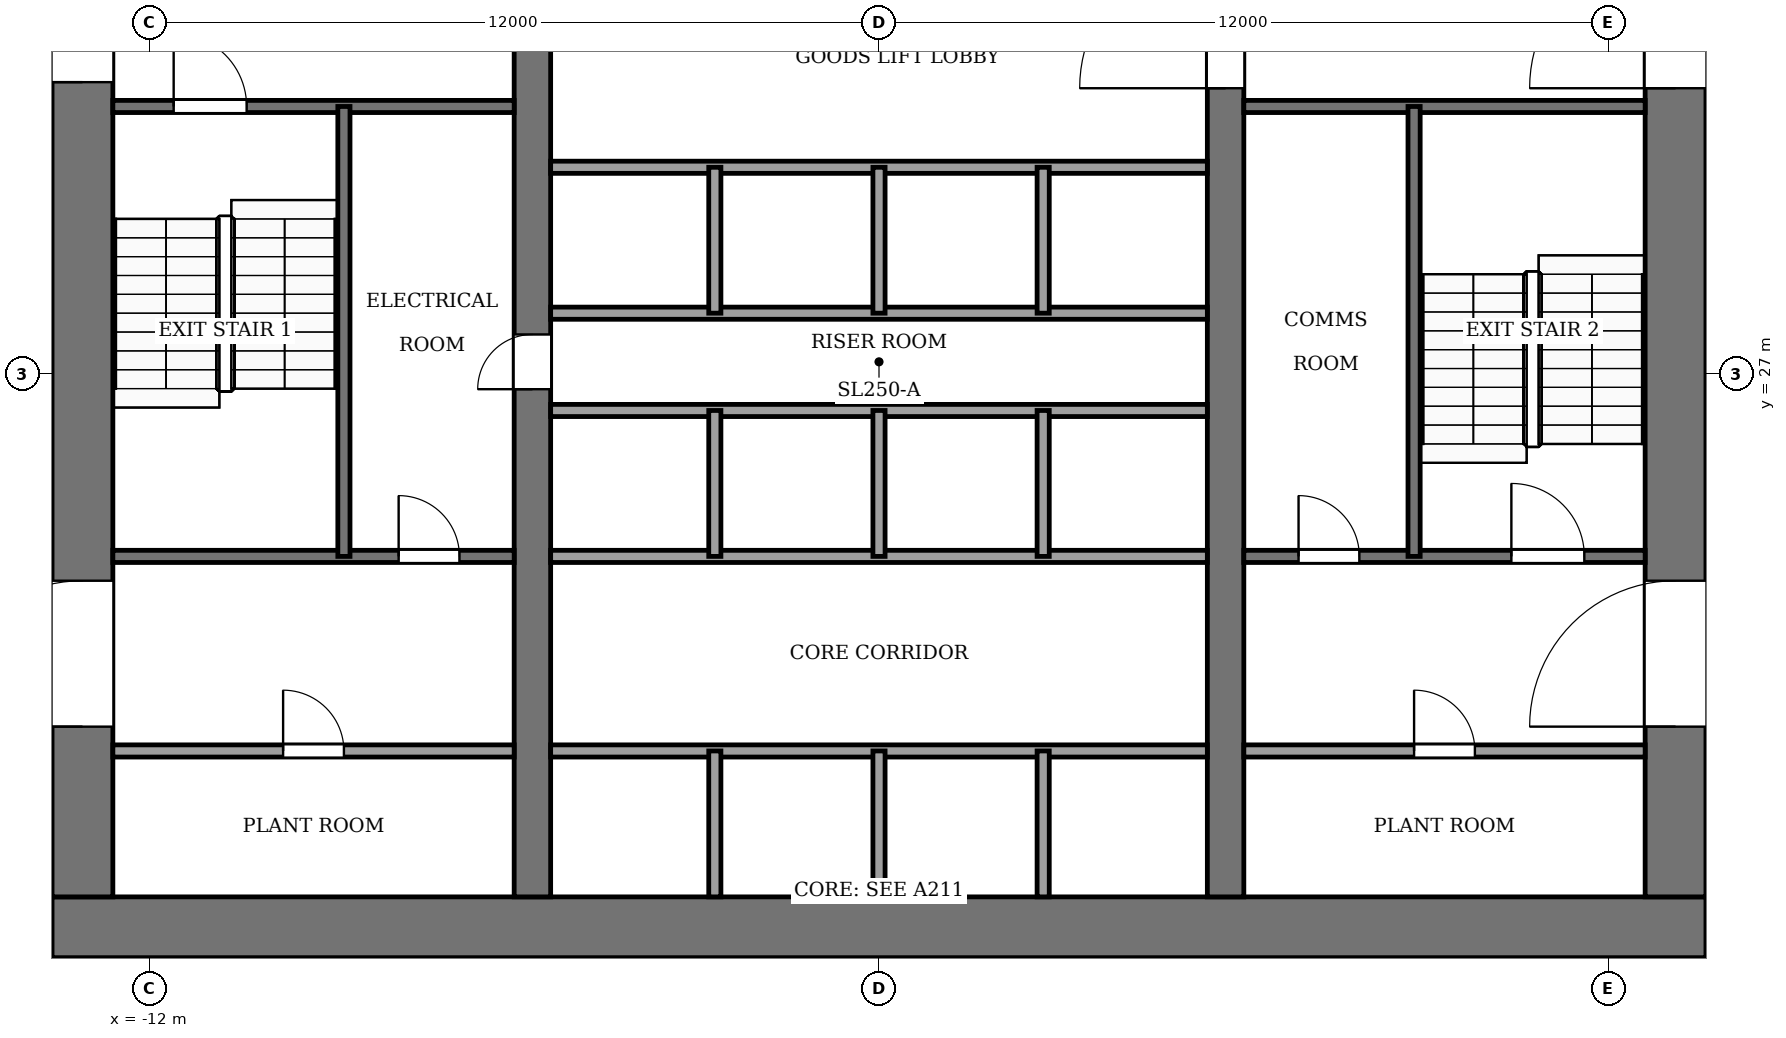
"""IFC4 building model, lengths in metres.
Left out: names, types, materials, properties, quantities, classifications, styles, units other than length and angle.
Written with IfcOpenShell. Run it as: python <this file> out.ifc"""

import sys

from ifc_helpers import new_model, si_unit, direction, frame, frame_2d, origin, place, context, subcontext, project, spatial, rectangle, extrude, element, fill, save


model = new_model("IFC4")
c1 = context("Model", 3, precision=1e-05, world=origin(), true_north=direction((0.0, 1.0)))
c2 = subcontext(c1, "Body", "Model", "MODEL_VIEW")
j1 = project(units=[si_unit("LENGTHUNIT", "METRE"), si_unit("PLANEANGLEUNIT", "RADIAN")], contexts=[c1])
p1 = place(None, origin())
s1 = spatial("IfcSite", under=j1, at=p1, CompositionType="ELEMENT")
p2 = place(p1, origin())
s2 = spatial("IfcBuilding", under=s1, at=p2, CompositionType="ELEMENT")
p3 = place(p2, frame((0.0, 0.0, 170.0)))
s3 = spatial("IfcBuildingStorey", under=s2, at=p3, CompositionType="ELEMENT", Elevation=170.0)
p4 = place(p3, frame((-13.6, 17.9, -0.25), z_axis=(0.0, 0.0, 1.0), x_axis=(1.0, 0.0, 0.0)))
e1 = element("IfcWall", 1, at=p4, inside=s3, PredefinedType="SHEAR", context=c2, shape_type="SweptSolid", body=[
    extrude(rectangle(XDim=27.2, YDim=1.0, at=frame_2d((13.6, 0.0))), origin(), (0.0, 0.0, 1.0), 7.12),
])
p5 = place(p3, frame((-13.1, 18.4, -0.25), z_axis=(0.0, 0.0, 1.0), x_axis=(0.0, 1.0, 0.0)))
e2 = element("IfcWall", 2, at=p5, inside=s3, PredefinedType="SHEAR", context=c2, shape_type="SweptSolid", body=[
    extrude(rectangle(XDim=19.2, YDim=1.0, at=frame_2d((9.6, 0.0))), origin(), (0.0, 0.0, 1.0), 7.12),
])
p6 = place(p5, frame((2.8, 0.0, 0.25)))
e3 = element("IfcOpeningElement", 3, at=p6, cuts=e2, PredefinedType="OPENING", context=c2, shape_type="SweptSolid", body=[
    extrude(rectangle(XDim=2.4, YDim=2.4, at=frame_2d((1.2, 1.2))), frame((0.0, 0.51, 0.0), z_axis=(0.0, -1.0, 0.0), x_axis=(1.0, 0.0, 0.0)), (0.0, 0.0, 1.0), 1.02),
])
p7 = place(p5, frame((13.4, 0.0, 0.25)))
e4 = element("IfcOpeningElement", 4, at=p7, cuts=e2, PredefinedType="OPENING", context=c2, shape_type="SweptSolid", body=[
    extrude(rectangle(XDim=1.4, YDim=2.2, at=frame_2d((0.7, 1.1))), frame((0.0, 0.51, 0.0), z_axis=(0.0, -1.0, 0.0), x_axis=(1.0, 0.0, 0.0)), (0.0, 0.0, 1.0), 1.02),
])
p8 = place(p3, frame((13.1, 18.4, -0.25), z_axis=(0.0, 0.0, 1.0), x_axis=(0.0, 1.0, 0.0)))
e5 = element("IfcWall", 5, at=p8, inside=s3, PredefinedType="SHEAR", context=c2, shape_type="SweptSolid", body=[
    extrude(rectangle(XDim=19.2, YDim=1.0, at=frame_2d((9.6, 0.0))), origin(), (0.0, 0.0, 1.0), 7.12),
])
p9 = place(p8, frame((2.8, 0.0, 0.25)))
e6 = element("IfcOpeningElement", 6, at=p9, cuts=e5, PredefinedType="OPENING", context=c2, shape_type="SweptSolid", body=[
    extrude(rectangle(XDim=2.4, YDim=2.4, at=frame_2d((1.2, 1.2))), frame((0.0, 0.51, 0.0), z_axis=(0.0, -1.0, 0.0), x_axis=(1.0, 0.0, 0.0)), (0.0, 0.0, 1.0), 1.02),
])
p10 = place(p8, frame((13.3, 0.0, 0.25)))
e7 = element("IfcOpeningElement", 7, at=p10, cuts=e5, PredefinedType="OPENING", context=c2, shape_type="SweptSolid", body=[
    extrude(rectangle(XDim=2.4, YDim=2.4, at=frame_2d((1.2, 1.2))), frame((0.0, 0.51, 0.0), z_axis=(0.0, -1.0, 0.0), x_axis=(1.0, 0.0, 0.0)), (0.0, 0.0, 1.0), 1.02),
])
p11 = place(p3, frame((-5.7, 18.4, -0.25), z_axis=(0.0, 0.0, 1.0), x_axis=(0.0, 1.0, 0.0)))
e8 = element("IfcWall", 8, at=p11, inside=s3, PredefinedType="SHEAR", context=c2, shape_type="SweptSolid", body=[
    extrude(rectangle(XDim=19.2, YDim=0.6, at=frame_2d((9.6, 0.0))), origin(), (0.0, 0.0, 1.0), 7.12),
])
p12 = place(p11, frame((8.35, 0.0, 0.25)))
e9 = element("IfcOpeningElement", 9, at=p12, cuts=e8, PredefinedType="OPENING", context=c2, shape_type="SweptSolid", body=[
    extrude(rectangle(XDim=0.9, YDim=2.1, at=frame_2d((0.45, 1.05))), frame((0.0, 0.31, 0.0), z_axis=(0.0, -1.0, 0.0), x_axis=(1.0, 0.0, 0.0)), (0.0, 0.0, 1.0), 0.62),
])
p13 = place(p3, frame((5.7, 18.4, -0.25), z_axis=(0.0, 0.0, 1.0), x_axis=(0.0, 1.0, 0.0)))
e10 = element("IfcWall", 10, at=p13, inside=s3, PredefinedType="SHEAR", context=c2, shape_type="SweptSolid", body=[
    extrude(rectangle(XDim=19.2, YDim=0.6, at=frame_2d((9.6, 0.0))), origin(), (0.0, 0.0, 1.0), 7.12),
])
p14 = place(p13, frame((13.3, 0.0, 0.25)))
e11 = element("IfcOpeningElement", 11, at=p14, cuts=e10, PredefinedType="OPENING", context=c2, shape_type="SweptSolid", body=[
    extrude(rectangle(XDim=2.4, YDim=2.4, at=frame_2d((1.2, 1.2))), frame((0.0, 0.31, 0.0), z_axis=(0.0, -1.0, 0.0), x_axis=(1.0, 0.0, 0.0)), (0.0, 0.0, 1.0), 0.62),
])
p15 = place(p3, frame((-12.6, 20.8, 0.0), z_axis=(0.0, 0.0, 1.0), x_axis=(1.0, 0.0, 0.0)))
e12 = element("IfcWall", 12, at=p15, inside=s3, PredefinedType="PARTITIONING", context=c2, shape_type="SweptSolid", body=[
    extrude(rectangle(XDim=6.6, YDim=0.2, at=frame_2d((3.3, 0.0))), origin(), (0.0, 0.0, 1.0), 6.87),
])
p16 = place(p15, frame((2.8, 0.0, 0.0)))
e13 = element("IfcOpeningElement", 13, at=p16, cuts=e12, PredefinedType="OPENING", context=c2, shape_type="SweptSolid", body=[
    extrude(rectangle(XDim=1.0, YDim=2.1, at=frame_2d((0.5, 1.05))), frame((0.0, 0.11, 0.0), z_axis=(0.0, -1.0, 0.0), x_axis=(1.0, 0.0, 0.0)), (0.0, 0.0, 1.0), 0.22),
])
p17 = place(p3, frame((-5.4, 20.8, 0.0), z_axis=(0.0, 0.0, 1.0), x_axis=(1.0, 0.0, 0.0)))
e14 = element("IfcWall", 14, at=p17, inside=s3, PredefinedType="PARTITIONING", context=c2, shape_type="SweptSolid", body=[
    extrude(rectangle(XDim=10.8, YDim=0.2, at=frame_2d((5.4, 0.0))), origin(), (0.0, 0.0, 1.0), 6.87),
])
p18 = place(p3, frame((6.0, 20.8, 0.0), z_axis=(0.0, 0.0, 1.0), x_axis=(1.0, 0.0, 0.0)))
e15 = element("IfcWall", 15, at=p18, inside=s3, PredefinedType="PARTITIONING", context=c2, shape_type="SweptSolid", body=[
    extrude(rectangle(XDim=6.6, YDim=0.2, at=frame_2d((3.3, 0.0))), origin(), (0.0, 0.0, 1.0), 6.87),
])
p19 = place(p18, frame((2.8, 0.0, 0.0)))
e16 = element("IfcOpeningElement", 16, at=p19, cuts=e15, PredefinedType="OPENING", context=c2, shape_type="SweptSolid", body=[
    extrude(rectangle(XDim=1.0, YDim=2.1, at=frame_2d((0.5, 1.05))), frame((0.0, 0.11, 0.0), z_axis=(0.0, -1.0, 0.0), x_axis=(1.0, 0.0, 0.0)), (0.0, 0.0, 1.0), 0.22),
])
p20 = place(p3, frame((-12.6, 24.0, 0.0), z_axis=(0.0, 0.0, 1.0), x_axis=(1.0, 0.0, 0.0)))
e17 = element("IfcWall", 17, at=p20, inside=s3, PredefinedType="PARTITIONING", context=c2, shape_type="SweptSolid", body=[
    extrude(rectangle(XDim=6.6, YDim=0.2, at=frame_2d((3.3, 0.0))), origin(), (0.0, 0.0, 1.0), 6.87),
])
p21 = place(p20, frame((4.7, 0.0, 0.0)))
e18 = element("IfcOpeningElement", 18, at=p21, cuts=e17, PredefinedType="OPENING", context=c2, shape_type="SweptSolid", body=[
    extrude(rectangle(XDim=1.0, YDim=2.1, at=frame_2d((0.5, 1.05))), frame((0.0, 0.11, 0.0), z_axis=(0.0, -1.0, 0.0), x_axis=(1.0, 0.0, 0.0)), (0.0, 0.0, 1.0), 0.22),
])
p22 = place(p3, frame((-5.4, 24.0, 0.0), z_axis=(0.0, 0.0, 1.0), x_axis=(1.0, 0.0, 0.0)))
e19 = element("IfcWall", 19, at=p22, inside=s3, PredefinedType="PARTITIONING", context=c2, shape_type="SweptSolid", body=[
    extrude(rectangle(XDim=10.8, YDim=0.2, at=frame_2d((5.4, 0.0))), origin(), (0.0, 0.0, 1.0), 6.87),
])
p23 = place(p3, frame((6.0, 24.0, 0.0), z_axis=(0.0, 0.0, 1.0), x_axis=(1.0, 0.0, 0.0)))
e20 = element("IfcWall", 20, at=p23, inside=s3, PredefinedType="PARTITIONING", context=c2, shape_type="SweptSolid", body=[
    extrude(rectangle(XDim=6.6, YDim=0.2, at=frame_2d((3.3, 0.0))), origin(), (0.0, 0.0, 1.0), 6.87),
])
p24 = place(p23, frame((0.9, 0.0, 0.0)))
e21 = element("IfcOpeningElement", 21, at=p24, cuts=e20, PredefinedType="OPENING", context=c2, shape_type="SweptSolid", body=[
    extrude(rectangle(XDim=1.0, YDim=2.1, at=frame_2d((0.5, 1.05))), frame((0.0, 0.11, 0.0), z_axis=(0.0, -1.0, 0.0), x_axis=(1.0, 0.0, 0.0)), (0.0, 0.0, 1.0), 0.22),
])
p25 = place(p23, frame((4.4, 0.0, 0.0)))
e22 = element("IfcOpeningElement", 22, at=p25, cuts=e20, PredefinedType="OPENING", context=c2, shape_type="SweptSolid", body=[
    extrude(rectangle(XDim=1.2, YDim=2.2, at=frame_2d((0.6, 1.1))), frame((0.0, 0.11, 0.0), z_axis=(0.0, -1.0, 0.0), x_axis=(1.0, 0.0, 0.0)), (0.0, 0.0, 1.0), 0.22),
])
for number, where, z_axis, x_axis in (
    (23, (-5.4, 26.4, 0.0), (0.0, 0.0, 1.0), (1.0, 0.0, 0.0)),
    (24, (-5.4, 28.0, 0.0), (0.0, 0.0, 1.0), (1.0, 0.0, 0.0)),
    (25, (-5.4, 30.4, 0.0), (0.0, 0.0, 1.0), (1.0, 0.0, 0.0)),
):
    element("IfcWall", number, at=place(p3, frame(where, z_axis=z_axis, x_axis=x_axis)), inside=s3, PredefinedType="PARTITIONING", context=c2, shape_type="SweptSolid", body=[
        extrude(rectangle(XDim=10.8, YDim=0.2, at=frame_2d((5.4, 0.0))), origin(), (0.0, 0.0, 1.0), 6.87),
    ])
p26 = place(p3, frame((-12.6, 31.4, 0.0), z_axis=(0.0, 0.0, 1.0), x_axis=(1.0, 0.0, 0.0)))
e26 = element("IfcWall", 26, at=p26, inside=s3, PredefinedType="PARTITIONING", context=c2, shape_type="SweptSolid", body=[
    extrude(rectangle(XDim=6.6, YDim=0.2, at=frame_2d((3.3, 0.0))), origin(), (0.0, 0.0, 1.0), 6.87),
])
p27 = place(p26, frame((1.0, 0.0, 0.0)))
e27 = element("IfcOpeningElement", 27, at=p27, cuts=e26, PredefinedType="OPENING", context=c2, shape_type="SweptSolid", body=[
    extrude(rectangle(XDim=1.2, YDim=2.2, at=frame_2d((0.6, 1.1))), frame((0.0, 0.11, 0.0), z_axis=(0.0, -1.0, 0.0), x_axis=(1.0, 0.0, 0.0)), (0.0, 0.0, 1.0), 0.22),
])
p28 = place(p3, frame((6.0, 31.4, 0.0), z_axis=(0.0, 0.0, 1.0), x_axis=(1.0, 0.0, 0.0)))
e28 = element("IfcWall", 28, at=p28, inside=s3, PredefinedType="PARTITIONING", context=c2, shape_type="SweptSolid", body=[
    extrude(rectangle(XDim=6.6, YDim=0.2, at=frame_2d((3.3, 0.0))), origin(), (0.0, 0.0, 1.0), 6.87),
])
p29 = place(p3, frame((-8.8, 24.0, 0.0), z_axis=(0.0, 0.0, 1.0), x_axis=(0.0, 1.0, 0.0)))
e29 = element("IfcWall", 29, at=p29, inside=s3, PredefinedType="PARTITIONING", context=c2, shape_type="SweptSolid", body=[
    extrude(rectangle(XDim=7.4, YDim=0.2, at=frame_2d((3.7, 0.0))), origin(), (0.0, 0.0, 1.0), 6.87),
])
p30 = place(p3, frame((-2.7, 18.4, 0.0), z_axis=(0.0, 0.0, 1.0), x_axis=(0.0, 1.0, 0.0)))
e30 = element("IfcWall", 30, at=p30, inside=s3, PredefinedType="PARTITIONING", context=c2, shape_type="SweptSolid", body=[
    extrude(rectangle(XDim=2.4, YDim=0.2, at=frame_2d((1.2, 0.0))), origin(), (0.0, 0.0, 1.0), 6.87),
])
for number, where, z_axis, x_axis in (
    (31, (-2.7, 24.0, 0.0), (0.0, 0.0, 1.0), (0.0, 1.0, 0.0)),
    (32, (-2.7, 28.0, 0.0), (0.0, 0.0, 1.0), (0.0, 1.0, 0.0)),
):
    element("IfcWall", number, at=place(p3, frame(where, z_axis=z_axis, x_axis=x_axis)), inside=s3, PredefinedType="PARTITIONING", context=c2, shape_type="SweptSolid", body=[
        extrude(rectangle(XDim=2.4, YDim=0.2, at=frame_2d((1.2, 0.0))), origin(), (0.0, 0.0, 1.0), 6.87),
    ])
p31 = place(p3, frame((0.0, 18.4, 0.0), z_axis=(0.0, 0.0, 1.0), x_axis=(0.0, 1.0, 0.0)))
e33 = element("IfcWall", 33, at=p31, inside=s3, PredefinedType="PARTITIONING", context=c2, shape_type="SweptSolid", body=[
    extrude(rectangle(XDim=2.4, YDim=0.2, at=frame_2d((1.2, 0.0))), origin(), (0.0, 0.0, 1.0), 6.87),
])
for number, where, z_axis, x_axis in (
    (34, (0.0, 24.0, 0.0), (0.0, 0.0, 1.0), (0.0, 1.0, 0.0)),
    (35, (0.0, 28.0, 0.0), (0.0, 0.0, 1.0), (0.0, 1.0, 0.0)),
):
    element("IfcWall", number, at=place(p3, frame(where, z_axis=z_axis, x_axis=x_axis)), inside=s3, PredefinedType="PARTITIONING", context=c2, shape_type="SweptSolid", body=[
        extrude(rectangle(XDim=2.4, YDim=0.2, at=frame_2d((1.2, 0.0))), origin(), (0.0, 0.0, 1.0), 6.87),
    ])
p32 = place(p3, frame((2.7, 18.4, 0.0), z_axis=(0.0, 0.0, 1.0), x_axis=(0.0, 1.0, 0.0)))
e36 = element("IfcWall", 36, at=p32, inside=s3, PredefinedType="PARTITIONING", context=c2, shape_type="SweptSolid", body=[
    extrude(rectangle(XDim=2.4, YDim=0.2, at=frame_2d((1.2, 0.0))), origin(), (0.0, 0.0, 1.0), 6.87),
])
for number, where, z_axis, x_axis in (
    (37, (2.7, 24.0, 0.0), (0.0, 0.0, 1.0), (0.0, 1.0, 0.0)),
    (38, (2.7, 28.0, 0.0), (0.0, 0.0, 1.0), (0.0, 1.0, 0.0)),
):
    element("IfcWall", number, at=place(p3, frame(where, z_axis=z_axis, x_axis=x_axis)), inside=s3, PredefinedType="PARTITIONING", context=c2, shape_type="SweptSolid", body=[
        extrude(rectangle(XDim=2.4, YDim=0.2, at=frame_2d((1.2, 0.0))), origin(), (0.0, 0.0, 1.0), 6.87),
    ])
p33 = place(p3, frame((8.8, 24.0, 0.0), z_axis=(0.0, 0.0, 1.0), x_axis=(0.0, 1.0, 0.0)))
e39 = element("IfcWall", 39, at=p33, inside=s3, PredefinedType="PARTITIONING", context=c2, shape_type="SweptSolid", body=[
    extrude(rectangle(XDim=7.4, YDim=0.2, at=frame_2d((3.7, 0.0))), origin(), (0.0, 0.0, 1.0), 6.87),
])
p34 = place(p16, origin())
e40 = element("IfcDoor", 40, at=p34, inside=s3, OperationType="SINGLE_SWING_LEFT", PredefinedType="DOOR", context=c2, shape_type="SweptSolid", body=[
    extrude(rectangle(XDim=1.0, YDim=2.1, at=frame_2d((0.5, 1.05))), frame((0.0, 0.025, 0.0), z_axis=(0.0, -1.0, 0.0), x_axis=(1.0, 0.0, 0.0)), (0.0, 0.0, 1.0), 0.05),
])
fill(e13, e40)
p35 = place(p19, origin())
e41 = element("IfcDoor", 41, at=p35, inside=s3, OperationType="SINGLE_SWING_RIGHT", PredefinedType="DOOR", context=c2, shape_type="SweptSolid", body=[
    extrude(rectangle(XDim=1.0, YDim=2.1, at=frame_2d((0.5, 1.05))), frame((0.0, 0.025, 0.0), z_axis=(0.0, -1.0, 0.0), x_axis=(1.0, 0.0, 0.0)), (0.0, 0.0, 1.0), 0.05),
])
fill(e16, e41)
p36 = place(p21, origin())
e42 = element("IfcDoor", 42, at=p36, inside=s3, OperationType="SINGLE_SWING_RIGHT", PredefinedType="DOOR", context=c2, shape_type="SweptSolid", body=[
    extrude(rectangle(XDim=1.0, YDim=2.1, at=frame_2d((0.5, 1.05))), frame((0.0, 0.025, 0.0), z_axis=(0.0, -1.0, 0.0), x_axis=(1.0, 0.0, 0.0)), (0.0, 0.0, 1.0), 0.05),
])
fill(e18, e42)
p37 = place(p24, origin())
e43 = element("IfcDoor", 43, at=p37, inside=s3, OperationType="SINGLE_SWING_LEFT", PredefinedType="DOOR", context=c2, shape_type="SweptSolid", body=[
    extrude(rectangle(XDim=1.0, YDim=2.1, at=frame_2d((0.5, 1.05))), frame((0.0, 0.025, 0.0), z_axis=(0.0, -1.0, 0.0), x_axis=(1.0, 0.0, 0.0)), (0.0, 0.0, 1.0), 0.05),
])
fill(e21, e43)
p38 = place(p12, origin())
e44 = element("IfcDoor", 44, at=p38, inside=s3, OperationType="SINGLE_SWING_RIGHT", PredefinedType="DOOR", context=c2, shape_type="SweptSolid", body=[
    extrude(rectangle(XDim=0.9, YDim=2.1, at=frame_2d((0.45, 1.05))), frame((0.0, 0.025, 0.0), z_axis=(0.0, -1.0, 0.0), x_axis=(1.0, 0.0, 0.0)), (0.0, 0.0, 1.0), 0.05),
])
fill(e9, e44)
p39 = place(p27, origin())
e45 = element("IfcDoor", 45, at=p39, inside=s3, OperationType="SINGLE_SWING_RIGHT", PredefinedType="DOOR", context=c2, shape_type="SweptSolid", body=[
    extrude(rectangle(XDim=1.2, YDim=2.2, at=frame_2d((0.6, 1.1))), frame((0.0, 0.025, 0.0), z_axis=(0.0, -1.0, 0.0), x_axis=(1.0, 0.0, 0.0)), (0.0, 0.0, 1.0), 0.05),
])
fill(e27, e45)
p40 = place(p25, origin())
e46 = element("IfcDoor", 46, at=p40, inside=s3, OperationType="SINGLE_SWING_LEFT", PredefinedType="DOOR", context=c2, shape_type="SweptSolid", body=[
    extrude(rectangle(XDim=1.2, YDim=2.2, at=frame_2d((0.6, 1.1))), frame((0.0, 0.025, 0.0), z_axis=(0.0, -1.0, 0.0), x_axis=(1.0, 0.0, 0.0)), (0.0, 0.0, 1.0), 0.05),
])
fill(e22, e46)
p41 = place(p14, origin())
e47 = element("IfcDoor", 47, at=p41, inside=s3, OperationType="DOUBLE_DOOR_SINGLE_SWING", PredefinedType="DOOR", context=c2, shape_type="SweptSolid", body=[
    extrude(rectangle(XDim=2.4, YDim=2.4, at=frame_2d((1.2, 1.2))), frame((0.0, 0.025, 0.0), z_axis=(0.0, -1.0, 0.0), x_axis=(1.0, 0.0, 0.0)), (0.0, 0.0, 1.0), 0.05),
])
fill(e11, e47)
p42 = place(p6, origin())
e48 = element("IfcDoor", 48, at=p42, inside=s3, OperationType="DOUBLE_DOOR_SINGLE_SWING", PredefinedType="DOOR", context=c2, shape_type="SweptSolid", body=[
    extrude(rectangle(XDim=2.4, YDim=2.4, at=frame_2d((1.2, 1.2))), frame((0.0, 0.025, 0.0), z_axis=(0.0, -1.0, 0.0), x_axis=(1.0, 0.0, 0.0)), (0.0, 0.0, 1.0), 0.05),
])
fill(e3, e48)
p43 = place(p9, origin())
e49 = element("IfcDoor", 49, at=p43, inside=s3, OperationType="DOUBLE_DOOR_SINGLE_SWING", PredefinedType="DOOR", context=c2, shape_type="SweptSolid", body=[
    extrude(rectangle(XDim=2.4, YDim=2.4, at=frame_2d((1.2, 1.2))), frame((0.0, 0.025, 0.0), z_axis=(0.0, -1.0, 0.0), x_axis=(1.0, 0.0, 0.0)), (0.0, 0.0, 1.0), 0.05),
])
fill(e6, e49)
p44 = place(p10, origin())
e50 = element("IfcDoor", 50, at=p44, inside=s3, OperationType="DOUBLE_DOOR_SINGLE_SWING", PredefinedType="DOOR", context=c2, shape_type="SweptSolid", body=[
    extrude(rectangle(XDim=2.4, YDim=2.4, at=frame_2d((1.2, 1.2))), frame((0.0, 0.025, 0.0), z_axis=(0.0, -1.0, 0.0), x_axis=(1.0, 0.0, 0.0)), (0.0, 0.0, 1.0), 0.05),
])
fill(e7, e50)
p45 = place(p7, origin())
e51 = element("IfcDoor", 51, at=p45, inside=s3, OperationType="SINGLE_SWING_RIGHT", PredefinedType="DOOR", context=c2, shape_type="SweptSolid", body=[
    extrude(rectangle(XDim=1.4, YDim=2.2, at=frame_2d((0.7, 1.1))), frame((0.0, 0.025, 0.0), z_axis=(0.0, -1.0, 0.0), x_axis=(1.0, 0.0, 0.0)), (0.0, 0.0, 1.0), 0.05),
])
fill(e4, e51)
save(model, sys.argv[1])
